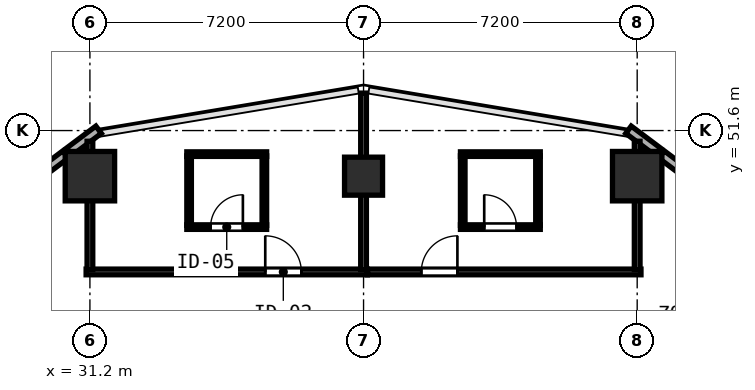
"""IFC4 building model, lengths in metres.
Left out: names, types, materials, properties, quantities, classifications, styles, units other than length and angle.
Written with IfcOpenShell. Run it as: python <this file> out.ifc"""

import sys

from ifc_helpers import new_model, si_unit, direction, frame, frame_2d, origin, origin_2d, place, context, subcontext, project, spatial, rectangle, hollow_rectangle, extrude, element, fill, save


model = new_model("IFC4")
c1 = context("Model", 3, precision=1e-05, world=origin(), true_north=direction((0.0, 1.0)))
c2 = subcontext(c1, "Body", "Model", "MODEL_VIEW")
j1 = project(units=[si_unit("LENGTHUNIT", "METRE"), si_unit("PLANEANGLEUNIT", "RADIAN")], contexts=[c1])
p1 = place(None, origin())
s1 = spatial("IfcSite", under=j1, at=p1, CompositionType="ELEMENT")
p2 = place(p1, origin())
s2 = spatial("IfcBuilding", under=s1, at=p2, CompositionType="ELEMENT")
p3 = place(p2, frame((0.0, 0.0, 39.2)))
s3 = spatial("IfcBuildingStorey", under=s2, at=p3, CompositionType="ELEMENT", Elevation=39.2)
for number, where, z_axis, x_axis in (
    (1, (31.2, 50.4, 0.0), (0.0, 0.0, 1.0), (1.0, 0.0, 0.0)),
    (2, (45.6, 50.4, 0.0), (0.0, 0.0, 1.0), (1.0, 0.0, 0.0)),
):
    element("IfcColumn", number, at=place(p3, frame(where, z_axis=z_axis, x_axis=x_axis)), inside=s3, PredefinedType="COLUMN", context=c2, shape_type="SweptSolid", body=[
        extrude(hollow_rectangle(XDim=1.3, YDim=1.3, WallThickness=0.048, at=origin_2d()), origin(), (0.0, 0.0, 1.0), 3.8),
    ])
p4 = place(p3, frame((38.4, 50.4, 0.0), z_axis=(0.0, 0.0, 1.0), x_axis=(1.0, 0.0, 0.0)))
e3 = element("IfcColumn", 3, at=p4, inside=s3, PredefinedType="COLUMN", context=c2, shape_type="SweptSolid", body=[
    extrude(hollow_rectangle(XDim=1.0, YDim=1.0, WallThickness=0.038, at=origin_2d()), origin(), (0.0, 0.0, 1.0), 3.8),
])
p5 = place(p3, frame((50.324, 47.907, 0.0), z_axis=(0.0, 0.0, 1.0), x_axis=(-0.8, 0.6, 0.0)))
e4 = element("IfcWall", 4, at=p5, inside=s3, PredefinedType="SOLIDWALL", context=c2, shape_type="SweptSolid", body=[
    extrude(rectangle(XDim=5.103, YDim=0.24, at=frame_2d((2.551, 0.0))), origin(), (0.0, 0.0, 1.0), 3.54),
])
p6 = place(p5, frame((1.6, 0.0, 0.85)))
e5 = element("IfcOpeningElement", 5, at=p6, cuts=e4, PredefinedType="OPENING", context=c2, shape_type="SweptSolid", body=[
    extrude(rectangle(XDim=1.2, YDim=1.85, at=frame_2d((0.6, 0.925))), frame((0.0, 0.13, 0.0), z_axis=(0.0, -1.0, 0.0), x_axis=(1.0, 0.0, 0.0)), (0.0, 0.0, 1.0), 0.26),
])
p7 = place(p3, frame((46.144, 51.042, 0.0), z_axis=(0.0, 0.0, 1.0), x_axis=(-0.8, 0.6, 0.0)))
e6 = element("IfcWall", 6, at=p7, inside=s3, PredefinedType="SOLIDWALL", context=c2, shape_type="SweptSolid", body=[
    extrude(rectangle(XDim=0.966, YDim=0.24, at=frame_2d((0.483, 0.0))), origin(), (0.0, 0.0, 1.0), 3.54),
])
p8 = place(p3, frame((31.429, 51.621, 0.0), z_axis=(0.0, 0.0, 1.0), x_axis=(-0.800090996409, -0.599878652284, 0.0)))
e7 = element("IfcWall", 7, at=p8, inside=s3, PredefinedType="SOLIDWALL", context=c2, shape_type="SweptSolid", body=[
    extrude(rectangle(XDim=0.966, YDim=0.24, at=frame_2d((0.483, 0.0))), origin(), (0.0, 0.0, 1.0), 3.54),
])
p9 = place(p3, frame((30.558, 50.969, 0.0), z_axis=(0.0, 0.0, 1.0), x_axis=(-0.8, -0.6, 0.0)))
e8 = element("IfcWall", 8, at=p9, inside=s3, PredefinedType="SOLIDWALL", context=c2, shape_type="SweptSolid", body=[
    extrude(rectangle(XDim=5.103, YDim=0.24, at=frame_2d((2.551, 0.0))), origin(), (0.0, 0.0, 1.0), 3.54),
])
p10 = place(p9, frame((1.6, 0.0, 0.85)))
e9 = element("IfcOpeningElement", 9, at=p10, cuts=e8, PredefinedType="OPENING", context=c2, shape_type="SweptSolid", body=[
    extrude(rectangle(XDim=1.2, YDim=1.85, at=frame_2d((0.6, 0.925))), frame((0.0, 0.13, 0.0), z_axis=(0.0, -1.0, 0.0), x_axis=(1.0, 0.0, 0.0)), (0.0, 0.0, 1.0), 0.26),
])
p11 = place(p3, frame((31.1, 47.88, 0.0), z_axis=(0.0, 0.0, 1.0), x_axis=(1.0, 0.0, 0.0)))
e10 = element("IfcWall", 10, at=p11, inside=s3, PredefinedType="PARTITIONING", context=c2, shape_type="SweptSolid", body=[
    extrude(rectangle(XDim=7.4, YDim=0.15, at=frame_2d((3.7, 0.0))), origin(), (0.0, 0.0, 1.0), 3.54),
])
p12 = place(p11, frame((4.714, 0.0, 0.0)))
e11 = element("IfcOpeningElement", 11, at=p12, cuts=e10, PredefinedType="OPENING", context=c2, shape_type="SweptSolid", body=[
    extrude(rectangle(XDim=0.95, YDim=2.15, at=frame_2d((0.475, 1.075))), frame((0.0, 0.085, 0.0), z_axis=(0.0, -1.0, 0.0), x_axis=(1.0, 0.0, 0.0)), (0.0, 0.0, 1.0), 0.17),
])
p13 = place(p3, frame((31.2, 47.94, 0.0), z_axis=(0.0, 0.0, 1.0), x_axis=(0.0, 1.0, 0.0)))
e12 = element("IfcWall", 12, at=p13, inside=s3, PredefinedType="PARTITIONING", context=c2, shape_type="SweptSolid", body=[
    extrude(rectangle(XDim=3.379, YDim=0.15, at=frame_2d((1.689, 0.0))), origin(), (0.0, 0.0, 1.0), 2.925),
])
p14 = place(p3, frame((38.4, 47.94, 0.0), z_axis=(0.0, 0.0, 1.0), x_axis=(0.0, 1.0, 0.0)))
e13 = element("IfcWall", 13, at=p14, inside=s3, PredefinedType="PARTITIONING", context=c2, shape_type="SweptSolid", body=[
    extrude(rectangle(XDim=4.645, YDim=0.15, at=frame_2d((2.323, 0.0))), origin(), (0.0, 0.0, 1.0), 3.54),
])
p15 = place(p3, frame((33.75, 50.98, 0.0), z_axis=(0.0, 0.0, 1.0), x_axis=(1.0, 0.0, 0.0)))
e14 = element("IfcWall", 14, at=p15, inside=s3, PredefinedType="PARTITIONING", context=c2, shape_type="SweptSolid", body=[
    extrude(rectangle(XDim=2.1, YDim=0.12, at=frame_2d((1.05, 0.0))), origin(), (0.0, 0.0, 1.0), 3.54),
])
p16 = place(p3, frame((33.75, 49.06, 0.0), z_axis=(0.0, 0.0, 1.0), x_axis=(1.0, 0.0, 0.0)))
e15 = element("IfcWall", 15, at=p16, inside=s3, PredefinedType="PARTITIONING", context=c2, shape_type="SweptSolid", body=[
    extrude(rectangle(XDim=2.1, YDim=0.12, at=frame_2d((1.05, 0.0))), origin(), (0.0, 0.0, 1.0), 3.54),
])
p17 = place(p16, frame((0.625, 0.0, 0.0)))
e16 = element("IfcOpeningElement", 16, at=p17, cuts=e15, PredefinedType="OPENING", context=c2, shape_type="SweptSolid", body=[
    extrude(rectangle(XDim=0.85, YDim=2.1, at=frame_2d((0.425, 1.05))), frame((0.0, 0.07, 0.0), z_axis=(0.0, -1.0, 0.0), x_axis=(1.0, 0.0, 0.0)), (0.0, 0.0, 1.0), 0.14),
])
for number, where, z_axis, x_axis in (
    (17, (33.81, 49.105, 0.0), (0.0, 0.0, 1.0), (0.0, 1.0, 0.0)),
    (18, (35.79, 49.105, 0.0), (0.0, 0.0, 1.0), (0.0, 1.0, 0.0)),
):
    element("IfcWall", number, at=place(p3, frame(where, z_axis=z_axis, x_axis=x_axis)), inside=s3, PredefinedType="PARTITIONING", context=c2, shape_type="SweptSolid", body=[
        extrude(rectangle(XDim=1.83, YDim=0.12, at=frame_2d((0.915, 0.0))), origin(), (0.0, 0.0, 1.0), 3.54),
    ])
p18 = place(p3, frame((38.502, 47.88, 0.0), z_axis=(0.0, 0.0, 1.0), x_axis=(1.0, 0.0, 0.0)))
e19 = element("IfcWall", 19, at=p18, inside=s3, PredefinedType="PARTITIONING", context=c2, shape_type="SweptSolid", body=[
    extrude(rectangle(XDim=7.198, YDim=0.15, at=frame_2d((3.599, 0.0))), origin(), (0.0, 0.0, 1.0), 3.54),
])
p19 = place(p18, frame((1.417, 0.0, 0.0)))
e20 = element("IfcOpeningElement", 20, at=p19, cuts=e19, PredefinedType="OPENING", context=c2, shape_type="SweptSolid", body=[
    extrude(rectangle(XDim=0.95, YDim=2.15, at=frame_2d((0.475, 1.075))), frame((0.0, 0.085, 0.0), z_axis=(0.0, -1.0, 0.0), x_axis=(1.0, 0.0, 0.0)), (0.0, 0.0, 1.0), 0.17),
])
p20 = place(p3, frame((45.6, 47.94, 0.0), z_axis=(0.0, 0.0, 1.0), x_axis=(0.0, 1.0, 0.0)))
e21 = element("IfcWall", 21, at=p20, inside=s3, PredefinedType="PARTITIONING", context=c2, shape_type="SweptSolid", body=[
    extrude(rectangle(XDim=3.379, YDim=0.15, at=frame_2d((1.689, 0.0))), origin(), (0.0, 0.0, 1.0), 2.925),
])
p21 = place(p3, frame((40.95, 50.98, 0.0), z_axis=(0.0, 0.0, 1.0), x_axis=(1.0, 0.0, 0.0)))
e22 = element("IfcWall", 22, at=p21, inside=s3, PredefinedType="PARTITIONING", context=c2, shape_type="SweptSolid", body=[
    extrude(rectangle(XDim=2.1, YDim=0.12, at=frame_2d((1.05, 0.0))), origin(), (0.0, 0.0, 1.0), 3.54),
])
p22 = place(p3, frame((40.95, 49.06, 0.0), z_axis=(0.0, 0.0, 1.0), x_axis=(1.0, 0.0, 0.0)))
e23 = element("IfcWall", 23, at=p22, inside=s3, PredefinedType="PARTITIONING", context=c2, shape_type="SweptSolid", body=[
    extrude(rectangle(XDim=2.1, YDim=0.12, at=frame_2d((1.05, 0.0))), origin(), (0.0, 0.0, 1.0), 3.54),
])
p23 = place(p22, frame((0.625, 0.0, 0.0)))
e24 = element("IfcOpeningElement", 24, at=p23, cuts=e23, PredefinedType="OPENING", context=c2, shape_type="SweptSolid", body=[
    extrude(rectangle(XDim=0.85, YDim=2.1, at=frame_2d((0.425, 1.05))), frame((0.0, 0.07, 0.0), z_axis=(0.0, -1.0, 0.0), x_axis=(1.0, 0.0, 0.0)), (0.0, 0.0, 1.0), 0.14),
])
for number, where, z_axis, x_axis in (
    (25, (41.01, 49.105, 0.0), (0.0, 0.0, 1.0), (0.0, 1.0, 0.0)),
    (26, (42.99, 49.105, 0.0), (0.0, 0.0, 1.0), (0.0, 1.0, 0.0)),
):
    element("IfcWall", number, at=place(p3, frame(where, z_axis=z_axis, x_axis=x_axis)), inside=s3, PredefinedType="PARTITIONING", context=c2, shape_type="SweptSolid", body=[
        extrude(rectangle(XDim=1.83, YDim=0.12, at=frame_2d((0.915, 0.0))), origin(), (0.0, 0.0, 1.0), 3.54),
    ])
p24 = place(p12, origin())
e27 = element("IfcDoor", 27, at=p24, inside=s3, OperationType="SINGLE_SWING_LEFT", PredefinedType="DOOR", context=c2, shape_type="SweptSolid", body=[
    extrude(rectangle(XDim=0.95, YDim=2.15, at=frame_2d((0.475, 1.075))), frame((0.0, 0.025, 0.0), z_axis=(0.0, -1.0, 0.0), x_axis=(1.0, 0.0, 0.0)), (0.0, 0.0, 1.0), 0.05),
])
fill(e11, e27)
p25 = place(p17, origin())
e28 = element("IfcDoor", 28, at=p25, inside=s3, OperationType="SINGLE_SWING_RIGHT", PredefinedType="DOOR", context=c2, shape_type="SweptSolid", body=[
    extrude(rectangle(XDim=0.85, YDim=2.1, at=frame_2d((0.425, 1.05))), frame((0.0, 0.025, 0.0), z_axis=(0.0, -1.0, 0.0), x_axis=(1.0, 0.0, 0.0)), (0.0, 0.0, 1.0), 0.05),
])
fill(e16, e28)
p26 = place(p19, origin())
e29 = element("IfcDoor", 29, at=p26, inside=s3, OperationType="SINGLE_SWING_RIGHT", PredefinedType="DOOR", context=c2, shape_type="SweptSolid", body=[
    extrude(rectangle(XDim=0.95, YDim=2.15, at=frame_2d((0.475, 1.075))), frame((0.0, 0.025, 0.0), z_axis=(0.0, -1.0, 0.0), x_axis=(1.0, 0.0, 0.0)), (0.0, 0.0, 1.0), 0.05),
])
fill(e20, e29)
p27 = place(p23, origin())
e30 = element("IfcDoor", 30, at=p27, inside=s3, OperationType="SINGLE_SWING_LEFT", PredefinedType="DOOR", context=c2, shape_type="SweptSolid", body=[
    extrude(rectangle(XDim=0.85, YDim=2.1, at=frame_2d((0.425, 1.05))), frame((0.0, 0.025, 0.0), z_axis=(0.0, -1.0, 0.0), x_axis=(1.0, 0.0, 0.0)), (0.0, 0.0, 1.0), 0.05),
])
fill(e24, e30)
save(model, sys.argv[1])
